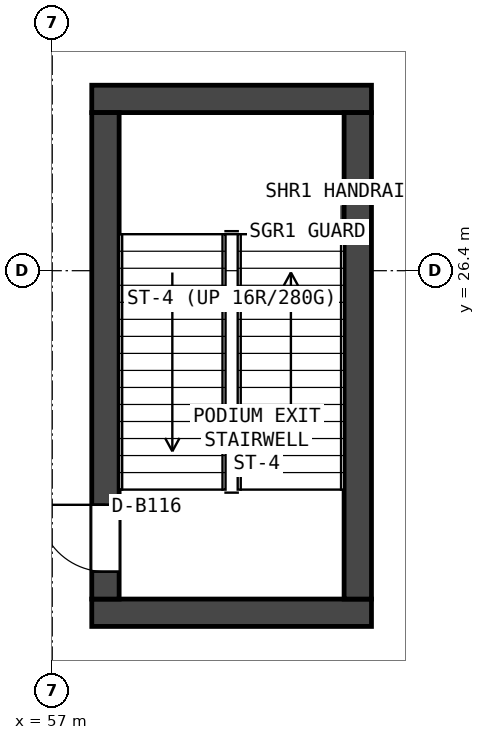
"""IFC4 building model, lengths in metres.
Left out: names, types, materials, properties, quantities, classifications, styles, units other than length and angle.
Written with IfcOpenShell. Run it as: python <this file> out.ifc"""

import sys

from ifc_helpers import new_model, si_unit, direction, frame, frame_2d, origin, place, context, subcontext, project, spatial, rectangle, extrude, element, fill, save


model = new_model("IFC4")
c1 = context("Model", 3, precision=1e-05, world=origin(), true_north=direction((0.0, 1.0)))
c2 = subcontext(c1, "Body", "Model", "MODEL_VIEW")
j1 = project(units=[si_unit("LENGTHUNIT", "METRE"), si_unit("PLANEANGLEUNIT", "RADIAN")], contexts=[c1])
p1 = place(None, origin())
s1 = spatial("IfcSite", under=j1, at=p1, CompositionType="ELEMENT")
p2 = place(p1, origin())
s2 = spatial("IfcBuilding", under=s1, at=p2, CompositionType="ELEMENT")
p3 = place(p2, frame((0.0, 0.0, -5.4)))
s3 = spatial("IfcBuildingStorey", under=s2, at=p3, CompositionType="ELEMENT", Elevation=-5.4)
for number, where, z_axis, x_axis in (
    (1, (57.65, 20.775, 0.0), (0.0, 0.0, 1.0), (1.0, 0.0, 0.0)),
    (2, (57.65, 29.225, 0.0), (0.0, 0.0, 1.0), (1.0, 0.0, 0.0)),
):
    element("IfcWall", number, at=place(p3, frame(where, z_axis=z_axis, x_axis=x_axis)), inside=s3, PredefinedType="SHEAR", context=c2, shape_type="SweptSolid", body=[
        extrude(rectangle(XDim=4.6, YDim=0.45, at=frame_2d((2.3, 0.0))), origin(), (0.0, 0.0, 1.0), 5.05),
    ])
p4 = place(p3, frame((57.875, 21.0, 0.0), z_axis=(0.0, 0.0, 1.0), x_axis=(0.0, 1.0, 0.0)))
e3 = element("IfcWall", 3, at=p4, inside=s3, PredefinedType="SHEAR", context=c2, shape_type="SweptSolid", body=[
    extrude(rectangle(XDim=8.0, YDim=0.45, at=frame_2d((4.0, 0.0))), origin(), (0.0, 0.0, 1.0), 5.05),
])
p5 = place(p4, frame((0.45, 0.0, 0.0)))
e4 = element("IfcOpeningElement", 4, at=p5, cuts=e3, PredefinedType="OPENING", context=c2, shape_type="SweptSolid", body=[
    extrude(rectangle(XDim=1.1, YDim=2.15, at=frame_2d((0.55, 1.075))), frame((0.0, 0.235, 0.0), z_axis=(0.0, -1.0, 0.0), x_axis=(1.0, 0.0, 0.0)), (0.0, 0.0, 1.0), 0.47),
])
p6 = place(p3, frame((62.025, 21.0, 0.0), z_axis=(0.0, 0.0, 1.0), x_axis=(0.0, 1.0, 0.0)))
e5 = element("IfcWall", 5, at=p6, inside=s3, PredefinedType="SHEAR", context=c2, shape_type="SweptSolid", body=[
    extrude(rectangle(XDim=8.0, YDim=0.45, at=frame_2d((4.0, 0.0))), origin(), (0.0, 0.0, 1.0), 5.05),
])
p7 = place(p5, origin())
e6 = element("IfcDoor", 6, at=p7, inside=s3, OperationType="SINGLE_SWING_RIGHT", PredefinedType="DOOR", context=c2, shape_type="SweptSolid", body=[
    extrude(rectangle(XDim=1.1, YDim=2.15, at=frame_2d((0.55, 1.075))), frame((0.0, 0.025, 0.0), z_axis=(0.0, -1.0, 0.0), x_axis=(1.0, 0.0, 0.0)), (0.0, 0.0, 1.0), 0.05),
])
fill(e4, e6)
save(model, sys.argv[1])
